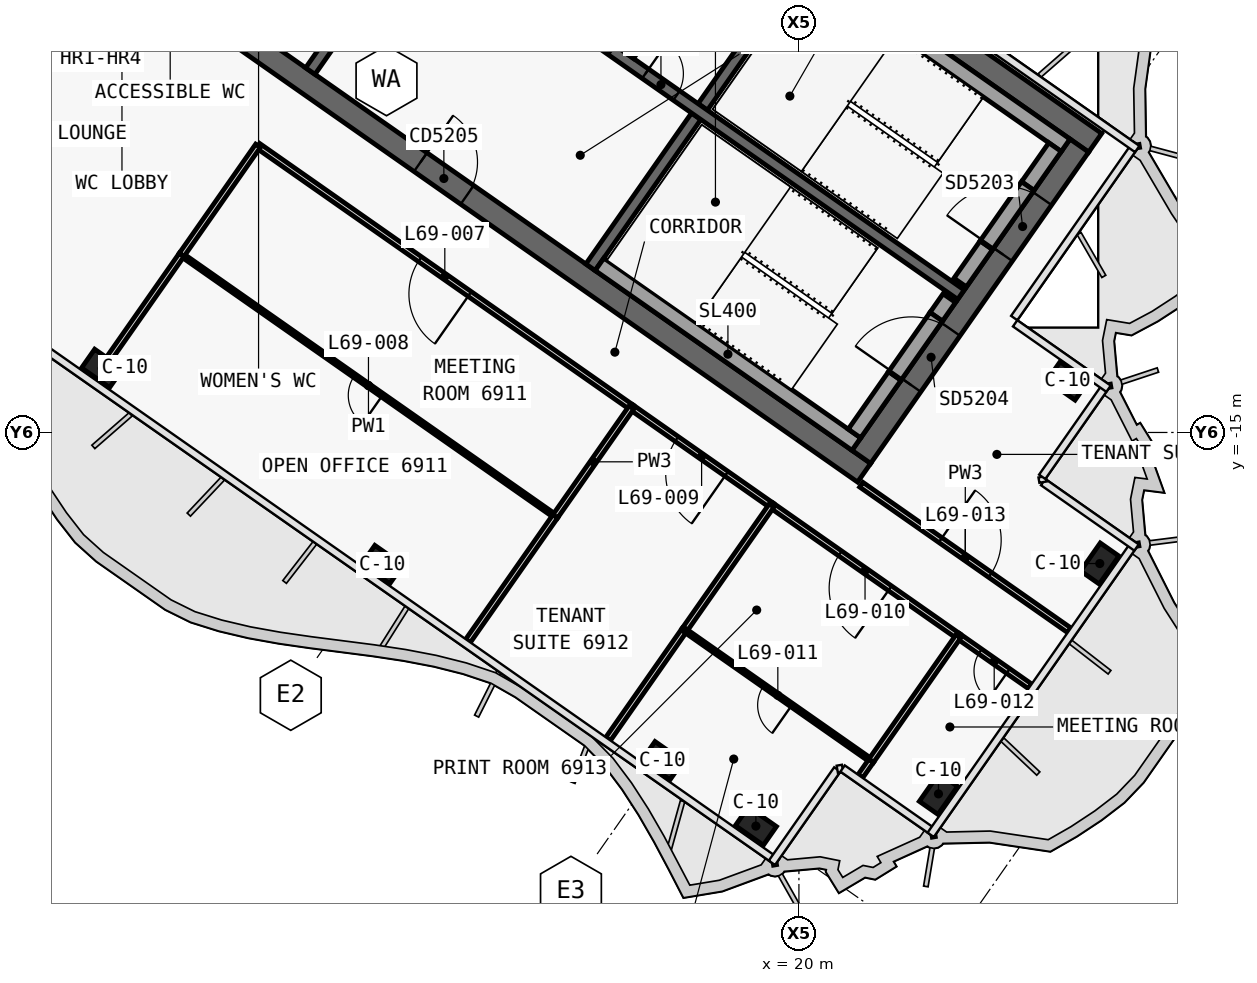
"""IFC4 building model, lengths in metres.
Left out: names, types, materials, properties, quantities, classifications, styles, units other than length and angle.
Written with IfcOpenShell. Run it as: python <this file> out.ifc"""

import sys

from ifc_helpers import new_model, si_unit, direction, frame, frame_2d, origin, origin_2d, place, context, subcontext, project, spatial, polyline, rectangle, outline, extrude, element, fill, save


model = new_model("IFC4")
c1 = context("Model", 3, precision=1e-05, world=origin(), true_north=direction((0.0, 1.0)))
c2 = subcontext(c1, "Body", "Model", "MODEL_VIEW")
j1 = project(units=[si_unit("LENGTHUNIT", "METRE"), si_unit("PLANEANGLEUNIT", "RADIAN")], contexts=[c1])
p1 = place(None, origin())
s1 = spatial("IfcSite", under=j1, at=p1, CompositionType="ELEMENT")
p2 = place(p1, origin())
s2 = spatial("IfcBuilding", under=s1, at=p2, CompositionType="ELEMENT")
p3 = place(p2, frame((0.0, 0.0, 291.7)))
s3 = spatial("IfcBuildingStorey", under=s2, at=p3, CompositionType="ELEMENT", Elevation=291.7)
p4 = place(p3, frame((0.028, 12.066, 0.0), z_axis=(0.0, 0.0, 1.0), x_axis=(0.819151382952, -0.573577380837, 0.0)))
e1 = element("IfcWall", 1, at=p4, inside=s3, PredefinedType="SHEAR", context=c2, shape_type="SweptSolid", body=[
    extrude(outline(polyline([(33.898, 0.3), (0.0, 0.3), (0.42, -0.3), (33.898, -0.3), (33.898, 0.3)])), origin(), (0.0, 0.0, 1.0), 3.9),
])
p5 = place(p3, frame((0.028, -0.874, 0.0), z_axis=(0.0, 0.0, 1.0), x_axis=(0.819150035022, -0.573579305871, 0.0)))
e2 = element("IfcWall", 2, at=p5, inside=s3, PredefinedType="SHEAR", context=c2, shape_type="SweptSolid", body=[
    extrude(outline(polyline([(26.476, 0.3), (0.0, 0.3), (0.42, -0.3), (26.476, -0.3), (26.476, 0.3)])), origin(), (0.0, 0.0, 1.0), 3.9),
])
p6 = place(p5, frame((0.826, 0.0, 0.0)))
e3 = element("IfcOpeningElement", 3, at=p6, cuts=e2, PredefinedType="OPENING", context=c2, shape_type="SweptSolid", body=[
    extrude(rectangle(XDim=1.5, YDim=2.1, at=frame_2d((0.75, 1.05))), frame((0.0, 0.31, 0.0), z_axis=(0.0, -1.0, 0.0), x_axis=(1.0, 0.0, 0.0)), (0.0, 0.0, 1.0), 0.62),
])
p7 = place(p5, frame((12.226, 0.0, 0.0)))
e4 = element("IfcOpeningElement", 4, at=p7, cuts=e2, PredefinedType="OPENING", context=c2, shape_type="SweptSolid", body=[
    extrude(rectangle(XDim=1.5, YDim=2.1, at=frame_2d((0.75, 1.05))), frame((0.0, 0.31, 0.0), z_axis=(0.0, -1.0, 0.0), x_axis=(1.0, 0.0, 0.0)), (0.0, 0.0, 1.0), 0.62),
])
p8 = place(p3, frame((21.642, -15.642, 0.0), z_axis=(0.0, 0.0, 1.0), x_axis=(0.573586866468, 0.819144740944, 0.0)))
e5 = element("IfcWall", 5, at=p8, inside=s3, PredefinedType="SHEAR", context=c2, shape_type="SweptSolid", body=[
    extrude(outline(polyline([(10.0, 0.3), (0.0, 0.3), (0.0, -0.3), (10.0, -0.3), (10.0, 0.3)])), origin(), (0.0, 0.0, 1.0), 3.9),
])
p9 = place(p8, frame((6.5, 0.0, 0.0)))
e6 = element("IfcOpeningElement", 6, at=p9, cuts=e5, PredefinedType="OPENING", context=c2, shape_type="SweptSolid", body=[
    extrude(rectangle(XDim=1.8, YDim=2.1, at=frame_2d((0.9, 1.05))), frame((0.0, 0.31, 0.0), z_axis=(0.0, -1.0, 0.0), x_axis=(1.0, 0.0, 0.0)), (0.0, 0.0, 1.0), 0.62),
])
p10 = place(p8, frame((2.3, 0.0, 0.0)))
e7 = element("IfcOpeningElement", 7, at=p10, cuts=e5, PredefinedType="OPENING", context=c2, shape_type="SweptSolid", body=[
    extrude(rectangle(XDim=1.8, YDim=2.1, at=frame_2d((0.9, 1.05))), frame((0.0, 0.31, 0.0), z_axis=(0.0, -1.0, 0.0), x_axis=(1.0, 0.0, 0.0)), (0.0, 0.0, 1.0), 0.62),
])
p11 = place(p3, frame((7.143, -5.49, 0.0), z_axis=(0.0, 0.0, 1.0), x_axis=(0.573617744349, 0.819123118565, 0.0)))
e8 = element("IfcWall", 8, at=p11, inside=s3, PredefinedType="SHEAR", context=c2, shape_type="SweptSolid", body=[
    extrude(outline(polyline([(0.0, 0.15), (0.0, -0.15), (4.85, -0.15), (4.85, 0.15), (0.0, 0.15)])), origin(), (0.0, 0.0, 1.0), 3.9),
])
p12 = place(p3, frame((14.515, -10.652, 0.0), z_axis=(0.0, 0.0, 1.0), x_axis=(0.573560315113, 0.819163332265, 0.0)))
e9 = element("IfcWall", 9, at=p12, inside=s3, PredefinedType="SHEAR", context=c2, shape_type="SweptSolid", body=[
    extrude(outline(polyline([(0.0, 0.15), (0.0, -0.15), (4.85, -0.15), (4.85, 0.15), (0.0, 0.15)])), origin(), (0.0, 0.0, 1.0), 3.9),
])
p13 = place(p3, frame((17.469, -6.433, 0.0), z_axis=(0.0, 0.0, 1.0), x_axis=(0.573594092424, 0.81913968109, 0.0)))
e10 = element("IfcWall", 10, at=p13, inside=s3, PredefinedType="SHEAR", context=c2, shape_type="SweptSolid", body=[
    extrude(outline(polyline([(4.85, -0.15), (4.85, 0.15), (0.0, 0.15), (0.0, -0.15), (4.85, -0.15)])), origin(), (0.0, 0.0, 1.0), 3.9),
])
p14 = place(p3, frame((2.638, 3.768, 0.0), z_axis=(0.0, 0.0, 1.0), x_axis=(0.819155014212, -0.573572194837, 0.0)))
e11 = element("IfcWall", 11, at=p14, inside=s3, PredefinedType="SHEAR", context=c2, shape_type="SweptSolid", body=[
    extrude(outline(polyline([(0.0, 0.15), (0.0, -0.15), (26.4, -0.15), (26.4, 0.15), (0.0, 0.15)])), origin(), (0.0, 0.0, 1.0), 3.9),
])
p15 = place(p14, frame((9.637, 0.0, 0.0)))
e12 = element("IfcOpeningElement", 12, at=p15, cuts=e11, PredefinedType="OPENING", context=c2, shape_type="SweptSolid", body=[
    extrude(rectangle(XDim=1.2, YDim=2.1, at=frame_2d((0.6, 1.05))), frame((0.0, 0.16, 0.0), z_axis=(0.0, -1.0, 0.0), x_axis=(1.0, 0.0, 0.0)), (0.0, 0.0, 1.0), 0.32),
])
p16 = place(p14, frame((11.812, 0.0, 0.0)))
e13 = element("IfcOpeningElement", 13, at=p16, cuts=e11, PredefinedType="OPENING", context=c2, shape_type="SweptSolid", body=[
    extrude(rectangle(XDim=1.2, YDim=2.1, at=frame_2d((0.6, 1.05))), frame((0.0, 0.16, 0.0), z_axis=(0.0, -1.0, 0.0), x_axis=(1.0, 0.0, 0.0)), (0.0, 0.0, 1.0), 0.32),
])
p17 = place(p14, frame((13.988, 0.0, 0.0)))
e14 = element("IfcOpeningElement", 14, at=p17, cuts=e11, PredefinedType="OPENING", context=c2, shape_type="SweptSolid", body=[
    extrude(rectangle(XDim=1.2, YDim=2.1, at=frame_2d((0.6, 1.05))), frame((0.0, 0.16, 0.0), z_axis=(0.0, -1.0, 0.0), x_axis=(1.0, 0.0, 0.0)), (0.0, 0.0, 1.0), 0.32),
])
p18 = place(p14, frame((16.262, 0.0, 0.0)))
e15 = element("IfcOpeningElement", 15, at=p18, cuts=e11, PredefinedType="OPENING", context=c2, shape_type="SweptSolid", body=[
    extrude(rectangle(XDim=1.0, YDim=2.1, at=frame_2d((0.5, 1.05))), frame((0.0, 0.16, 0.0), z_axis=(0.0, -1.0, 0.0), x_axis=(1.0, 0.0, 0.0)), (0.0, 0.0, 1.0), 0.32),
])
for number, where, z_axis, x_axis in (
    (16, (1.665, -13.313, 0.0), (0.0, 0.0, 1.0), (0.819, -0.574, 0.0)),
    (17, (9.038, -18.475, 0.0), (0.0, 0.0, 1.0), (0.819, -0.574, 0.0)),
    (18, (16.41, -23.637, 0.0), (0.0, 0.0, 1.0), (0.819, -0.574, 0.0)),
    (19, (18.867, -25.358, 0.0), (0.0, 0.0, 1.0), (0.819, -0.574, 0.0)),
    (20, (27.07, -13.644, 0.0), (0.0, 0.0, 1.0), (0.819, -0.574, 0.0)),
    (21, (23.672, -24.51, 0.0), (0.0, 0.0, 1.0), (0.574, 0.819, 0.0)),
    (22, (27.917, -18.449, 0.0), (0.0, 0.0, 1.0), (0.574, 0.819, 0.0)),
):
    element("IfcColumn", number, at=place(p3, frame(where, z_axis=z_axis, x_axis=x_axis)), inside=s3, PredefinedType="COLUMN", context=c2, shape_type="SweptSolid", body=[
        extrude(rectangle(XDim=0.9, YDim=0.6, at=origin_2d()), origin(), (0.0, 0.0, 1.0), 3.9),
    ])
p19 = place(p3, frame((15.565, -5.1, 0.0), z_axis=(0.0, 0.0, 1.0), x_axis=(0.573560315113, 0.819163332265, 0.0)))
e23 = element("IfcWall", 23, at=p19, inside=s3, PredefinedType="SOLIDWALL", context=c2, shape_type="SweptSolid", body=[
    extrude(rectangle(XDim=4.85, YDim=0.2, at=frame_2d((2.425, 0.0))), origin(), (0.0, 0.0, 1.0), 3.9),
])
p20 = place(p3, frame((20.259, -2.71, 0.0), z_axis=(0.0, 0.0, 1.0), x_axis=(0.81914849389, -0.573581506813, 0.0)))
e24 = element("IfcWall", 24, at=p20, inside=s3, PredefinedType="SOLIDWALL", context=c2, shape_type="SweptSolid", body=[
    extrude(rectangle(XDim=8.25, YDim=0.4, at=frame_2d((4.125, 0.0))), origin(), (0.0, 0.0, 1.0), 3.62),
])
p21 = place(p3, frame((24.244, -11.055, 0.0), z_axis=(0.0, 0.0, 1.0), x_axis=(0.573571582932, 0.819155442668, 0.0)))
e25 = element("IfcWall", 25, at=p21, inside=s3, PredefinedType="SOLIDWALL", context=c2, shape_type="SweptSolid", body=[
    extrude(rectangle(XDim=1.2, YDim=0.4, at=frame_2d((0.6, 0.0))), origin(), (0.0, 0.0, 1.0), 3.62),
])
p22 = place(p3, frame((26.022, -8.515, 0.0), z_axis=(0.0, 0.0, 1.0), x_axis=(0.573619628835, 0.819121798889, 0.0)))
e26 = element("IfcWall", 26, at=p22, inside=s3, PredefinedType="SOLIDWALL", context=c2, shape_type="SweptSolid", body=[
    extrude(rectangle(XDim=1.25, YDim=0.4, at=frame_2d((0.625, 0.0))), origin(), (0.0, 0.0, 1.0), 3.62),
])
p23 = place(p3, frame((24.932, -10.072, 2.15), z_axis=(0.0, 0.0, 1.0), x_axis=(0.573591692345, 0.819141361715, 0.0)))
e27 = element("IfcWall", 27, at=p23, inside=s3, PredefinedType="SOLIDWALL", context=c2, shape_type="SweptSolid", body=[
    extrude(rectangle(XDim=1.9, YDim=0.4, at=frame_2d((0.95, 0.0))), origin(), (0.0, 0.0, 1.0), 1.47),
])
p24 = place(p3, frame((14.753, -10.574, 0.0), z_axis=(0.0, 0.0, 1.0), x_axis=(0.819158229677, -0.573567602601, 0.0)))
e28 = element("IfcWall", 28, at=p24, inside=s3, PredefinedType="SOLIDWALL", context=c2, shape_type="SweptSolid", body=[
    extrude(rectangle(XDim=8.25, YDim=0.4, at=frame_2d((4.125, 0.0))), origin(), (0.0, 0.0, 1.0), 3.62),
])
p25 = place(p3, frame((21.462, -15.028, 0.0), z_axis=(0.0, 0.0, 1.0), x_axis=(0.573559770908, 0.819163713305, 0.0)))
e29 = element("IfcWall", 29, at=p25, inside=s3, PredefinedType="SOLIDWALL", context=c2, shape_type="SweptSolid", body=[
    extrude(rectangle(XDim=1.85, YDim=0.4, at=frame_2d((0.925, 0.0))), origin(), (0.0, 0.0, 1.0), 3.62),
])
p26 = place(p3, frame((23.613, -11.956, 0.0), z_axis=(0.0, 0.0, 1.0), x_axis=(0.573435029941, 0.819251039936, 0.0)))
e30 = element("IfcWall", 30, at=p26, inside=s3, PredefinedType="SOLIDWALL", context=c2, shape_type="SweptSolid", body=[
    extrude(rectangle(XDim=0.6, YDim=0.4, at=frame_2d((0.3, 0.0))), origin(), (0.0, 0.0, 1.0), 3.62),
])
p27 = place(p3, frame((22.523, -13.512, 2.15), z_axis=(0.0, 0.0, 1.0), x_axis=(0.573591692345, 0.819141361715, 0.0)))
e31 = element("IfcWall", 31, at=p27, inside=s3, PredefinedType="SOLIDWALL", context=c2, shape_type="SweptSolid", body=[
    extrude(rectangle(XDim=1.9, YDim=0.4, at=frame_2d((0.95, 0.0))), origin(), (0.0, 0.0, 1.0), 1.47),
])
p28 = place(p3, frame((21.642, -16.375, 0.0), z_axis=(0.0, 0.0, 1.0), x_axis=(0.819147777977, -0.573582529227, 0.0)))
e32 = element("IfcWall", 32, at=p28, inside=s3, PredefinedType="PARTITIONING", context=c2, shape_type="SweptSolid", body=[
    extrude(rectangle(XDim=6.68, YDim=0.15, at=frame_2d((3.34, 0.0))), origin(), (0.0, 0.0, 1.0), 3.0),
])
p29 = place(p28, frame((2.54, 0.0, 0.0)))
e33 = element("IfcOpeningElement", 33, at=p29, cuts=e32, PredefinedType="OPENING", context=c2, shape_type="SweptSolid", body=[
    extrude(rectangle(XDim=1.6, YDim=2.1, at=frame_2d((0.8, 1.05))), frame((0.0, 0.085, 0.0), z_axis=(0.0, -1.0, 0.0), x_axis=(1.0, 0.0, 0.0)), (0.0, 0.0, 1.0), 0.17),
])
p30 = place(p3, frame((15.598, -14.34, 0.0), z_axis=(0.0, 0.0, 1.0), x_axis=(-0.81915546166, 0.573571555809, 0.0)))
e34 = element("IfcWall", 34, at=p30, inside=s3, PredefinedType="PARTITIONING", context=c2, shape_type="SweptSolid", body=[
    extrude(rectangle(XDim=12.002, YDim=0.15, at=frame_2d((6.001, 0.0))), origin(), (0.0, 0.0, 1.0), 3.05),
])
p31 = place(p30, frame((5.201, 0.0, 0.0)))
e35 = element("IfcOpeningElement", 35, at=p31, cuts=e34, PredefinedType="OPENING", context=c2, shape_type="SweptSolid", body=[
    extrude(rectangle(XDim=1.6, YDim=2.1, at=frame_2d((0.8, 1.05))), frame((0.0, 0.085, 0.0), z_axis=(0.0, -1.0, 0.0), x_axis=(1.0, 0.0, 0.0)), (0.0, 0.0, 1.0), 0.17),
])
p32 = place(p3, frame((19.284, -16.921, 0.0), z_axis=(0.0, 0.0, 1.0), x_axis=(-0.819165703328, 0.573556928727, 0.0)))
e36 = element("IfcWall", 36, at=p32, inside=s3, PredefinedType="PARTITIONING", context=c2, shape_type="SweptSolid", body=[
    extrude(rectangle(XDim=4.504, YDim=0.15, at=frame_2d((2.252, 0.0))), origin(), (0.0, 0.0, 1.0), 3.62),
])
p33 = place(p32, frame((1.452, 0.0, 0.0)))
e37 = element("IfcOpeningElement", 37, at=p33, cuts=e36, PredefinedType="OPENING", context=c2, shape_type="SweptSolid", body=[
    extrude(rectangle(XDim=1.6, YDim=2.1, at=frame_2d((0.8, 1.05))), frame((0.0, 0.085, 0.0), z_axis=(0.0, -1.0, 0.0), x_axis=(1.0, 0.0, 0.0)), (0.0, 0.0, 1.0), 0.17),
])
p34 = place(p3, frame((24.199, -20.362, 0.0), z_axis=(0.0, 0.0, 1.0), x_axis=(-0.819165052243, 0.573557858619, 0.0)))
e38 = element("IfcWall", 38, at=p34, inside=s3, PredefinedType="PARTITIONING", context=c2, shape_type="SweptSolid", body=[
    extrude(rectangle(XDim=6.004, YDim=0.15, at=frame_2d((3.002, 0.0))), origin(), (0.0, 0.0, 1.0), 3.05),
])
p35 = place(p34, frame((2.202, 0.0, 0.0)))
e39 = element("IfcOpeningElement", 39, at=p35, cuts=e38, PredefinedType="OPENING", context=c2, shape_type="SweptSolid", body=[
    extrude(rectangle(XDim=1.6, YDim=2.1, at=frame_2d((0.8, 1.05))), frame((0.0, 0.085, 0.0), z_axis=(0.0, -1.0, 0.0), x_axis=(1.0, 0.0, 0.0)), (0.0, 0.0, 1.0), 0.17),
])
p36 = place(p3, frame((26.081, -21.68, 0.0), z_axis=(0.0, 0.0, 1.0), x_axis=(-0.819172126429, 0.573547755014, 0.0)))
e40 = element("IfcWall", 40, at=p36, inside=s3, PredefinedType="PARTITIONING", context=c2, shape_type="SweptSolid", body=[
    extrude(rectangle(XDim=2.302, YDim=0.15, at=frame_2d((1.151, 0.0))), origin(), (0.0, 0.0, 1.0), 3.0),
])
p37 = place(p36, frame((0.701, 0.0, 0.0)))
e41 = element("IfcOpeningElement", 41, at=p37, cuts=e40, PredefinedType="OPENING", context=c2, shape_type="SweptSolid", body=[
    extrude(rectangle(XDim=0.9, YDim=2.1, at=frame_2d((0.45, 1.05))), frame((0.0, 0.085, 0.0), z_axis=(0.0, -1.0, 0.0), x_axis=(1.0, 0.0, 0.0)), (0.0, 0.0, 1.0), 0.17),
])
p38 = place(p3, frame((13.588, -17.207, 0.0), z_axis=(0.0, 0.0, 1.0), x_axis=(-0.819156404271, 0.573570209602, 0.0)))
e42 = element("IfcWall", 42, at=p38, inside=s3, PredefinedType="PARTITIONING", context=c2, shape_type="SweptSolid", body=[
    extrude(rectangle(XDim=12.0, YDim=0.1, at=frame_2d((6.0, 0.0))), origin(), (0.0, 0.0, 1.0), 3.05),
])
p39 = place(p38, frame((5.55, 0.0, 0.0)))
e43 = element("IfcOpeningElement", 43, at=p39, cuts=e42, PredefinedType="OPENING", context=c2, shape_type="SweptSolid", body=[
    extrude(rectangle(XDim=0.9, YDim=2.1, at=frame_2d((0.45, 1.05))), frame((0.0, 0.06, 0.0), z_axis=(0.0, -1.0, 0.0), x_axis=(1.0, 0.0, 0.0)), (0.0, 0.0, 1.0), 0.12),
])
p40 = place(p3, frame((13.588, -17.207, 0.0), z_axis=(0.0, 0.0, 1.0), x_axis=(-0.573560675104, -0.819163080207, 0.0)))
e44 = element("IfcWall", 44, at=p40, inside=s3, PredefinedType="PARTITIONING", context=c2, shape_type="SweptSolid", body=[
    extrude(rectangle(XDim=3.999, YDim=0.15, at=frame_2d((2.0, 0.0))), origin(), (0.0, 0.0, 1.0), 3.0),
])
p41 = place(p3, frame((1.849, -13.051, 0.0), z_axis=(0.0, 0.0, 1.0), x_axis=(0.573595235521, 0.819138880647, 0.0)))
e45 = element("IfcWall", 45, at=p41, inside=s3, PredefinedType="PARTITIONING", context=c2, shape_type="SweptSolid", body=[
    extrude(rectangle(XDim=3.329, YDim=0.15, at=frame_2d((1.665, 0.0))), origin(), (0.0, 0.0, 1.0), 3.05),
])
p42 = place(p3, frame((15.596, -14.339, 0.0), z_axis=(0.0, 0.0, 1.0), x_axis=(-0.573565328398, -0.819159822049, 0.0)))
e46 = element("IfcWall", 46, at=p42, inside=s3, PredefinedType="PARTITIONING", context=c2, shape_type="SweptSolid", body=[
    extrude(rectangle(XDim=3.5, YDim=0.15, at=frame_2d((1.75, 0.0))), origin(), (0.0, 0.0, 1.0), 3.62),
])
p43 = place(p3, frame((3.759, -10.323, 0.0), z_axis=(0.0, 0.0, 1.0), x_axis=(0.573598101901, 0.81913687348, 0.0)))
e47 = element("IfcWall", 47, at=p43, inside=s3, PredefinedType="PARTITIONING", context=c2, shape_type="SweptSolid", body=[
    extrude(rectangle(XDim=3.5, YDim=0.15, at=frame_2d((1.75, 0.0))), origin(), (0.0, 0.0, 1.0), 3.05),
])
p44 = place(p3, frame((16.989, -20.196, 0.0), z_axis=(0.0, 0.0, 1.0), x_axis=(-0.573560622794, -0.819163116834, 0.0)))
e48 = element("IfcWall", 48, at=p44, inside=s3, PredefinedType="PARTITIONING", context=c2, shape_type="SweptSolid", body=[
    extrude(rectangle(XDim=3.501, YDim=0.15, at=frame_2d((1.75, 0.0))), origin(), (0.0, 0.0, 1.0), 3.0),
])
p45 = place(p3, frame((19.282, -16.92, 0.0), z_axis=(0.0, 0.0, 1.0), x_axis=(-0.573630198485, -0.819114397008, 0.0)))
e49 = element("IfcWall", 49, at=p45, inside=s3, PredefinedType="PARTITIONING", context=c2, shape_type="SweptSolid", body=[
    extrude(rectangle(XDim=4.002, YDim=0.15, at=frame_2d((2.001, 0.0))), origin(), (0.0, 0.0, 1.0), 3.62),
])
p46 = place(p3, frame((21.902, -23.639, 0.0), z_axis=(0.0, 0.0, 1.0), x_axis=(-0.819149710902, 0.573579768758, 0.0)))
e50 = element("IfcWall", 50, at=p46, inside=s3, PredefinedType="PARTITIONING", context=c2, shape_type="SweptSolid", body=[
    extrude(rectangle(XDim=6.0, YDim=0.1, at=frame_2d((3.0, 0.0))), origin(), (0.0, 0.0, 1.0), 3.05),
])
p47 = place(p46, frame((2.55, 0.0, 0.0)))
e51 = element("IfcOpeningElement", 51, at=p47, cuts=e50, PredefinedType="OPENING", context=c2, shape_type="SweptSolid", body=[
    extrude(rectangle(XDim=0.9, YDim=2.1, at=frame_2d((0.45, 1.05))), frame((0.0, 0.06, 0.0), z_axis=(0.0, -1.0, 0.0), x_axis=(1.0, 0.0, 0.0)), (0.0, 0.0, 1.0), 0.12),
])
p48 = place(p3, frame((21.902, -23.639, 0.0), z_axis=(0.0, 0.0, 1.0), x_axis=(-0.573298184438, -0.819346807964, 0.0)))
e52 = element("IfcWall", 52, at=p48, inside=s3, PredefinedType="PARTITIONING", context=c2, shape_type="SweptSolid", body=[
    extrude(rectangle(XDim=0.499, YDim=0.15, at=frame_2d((0.25, 0.0))), origin(), (0.0, 0.0, 1.0), 3.62),
])
p49 = place(p3, frame((24.197, -20.361, 0.0), z_axis=(0.0, 0.0, 1.0), x_axis=(-0.573556557423, -0.819165963305, 0.0)))
e53 = element("IfcWall", 53, at=p49, inside=s3, PredefinedType="PARTITIONING", context=c2, shape_type="SweptSolid", body=[
    extrude(rectangle(XDim=4.0, YDim=0.15, at=frame_2d((2.0, 0.0))), origin(), (0.0, 0.0, 1.0), 3.05),
])
p50 = place(p18, origin())
e54 = element("IfcDoor", 54, at=p50, inside=s3, OperationType="SINGLE_SWING_RIGHT", PredefinedType="DOOR", context=c2, shape_type="SweptSolid", body=[
    extrude(rectangle(XDim=1.0, YDim=2.1, at=frame_2d((0.5, 1.05))), frame((0.0, 0.025, 0.0), z_axis=(0.0, -1.0, 0.0), x_axis=(1.0, 0.0, 0.0)), (0.0, 0.0, 1.0), 0.05),
])
fill(e15, e54)
p51 = place(p7, origin())
e55 = element("IfcDoor", 55, at=p51, inside=s3, OperationType="DOUBLE_DOOR_SINGLE_SWING", PredefinedType="DOOR", context=c2, shape_type="SweptSolid", body=[
    extrude(rectangle(XDim=1.5, YDim=2.1, at=frame_2d((0.75, 1.05))), frame((0.0, 0.025, 0.0), z_axis=(0.0, -1.0, 0.0), x_axis=(1.0, 0.0, 0.0)), (0.0, 0.0, 1.0), 0.05),
])
fill(e4, e55)
p52 = place(p9, origin())
e56 = element("IfcDoor", 56, at=p52, inside=s3, OperationType="DOUBLE_DOOR_SINGLE_SWING", PredefinedType="DOOR", context=c2, shape_type="SweptSolid", body=[
    extrude(rectangle(XDim=1.8, YDim=2.1, at=frame_2d((0.9, 1.05))), frame((0.0, 0.025, 0.0), z_axis=(0.0, -1.0, 0.0), x_axis=(1.0, 0.0, 0.0)), (0.0, 0.0, 1.0), 0.05),
])
fill(e6, e56)
p53 = place(p10, origin())
e57 = element("IfcDoor", 57, at=p53, inside=s3, OperationType="DOUBLE_DOOR_SINGLE_SWING", PredefinedType="DOOR", context=c2, shape_type="SweptSolid", body=[
    extrude(rectangle(XDim=1.8, YDim=2.1, at=frame_2d((0.9, 1.05))), frame((0.0, 0.025, 0.0), z_axis=(0.0, -1.0, 0.0), x_axis=(1.0, 0.0, 0.0)), (0.0, 0.0, 1.0), 0.05),
])
fill(e7, e57)
p54 = place(p31, origin())
e58 = element("IfcDoor", 58, at=p54, inside=s3, OperationType="DOUBLE_DOOR_SINGLE_SWING", PredefinedType="DOOR", context=c2, shape_type="SweptSolid", body=[
    extrude(rectangle(XDim=1.6, YDim=2.1, at=frame_2d((0.8, 1.05))), frame((0.0, 0.025, 0.0), z_axis=(0.0, -1.0, 0.0), x_axis=(1.0, 0.0, 0.0)), (0.0, 0.0, 1.0), 0.05),
])
fill(e35, e58)
p55 = place(p39, origin())
e59 = element("IfcDoor", 59, at=p55, inside=s3, OperationType="SINGLE_SWING_RIGHT", PredefinedType="DOOR", context=c2, shape_type="SweptSolid", body=[
    extrude(rectangle(XDim=0.9, YDim=2.1, at=frame_2d((0.45, 1.05))), frame((0.0, 0.025, 0.0), z_axis=(0.0, -1.0, 0.0), x_axis=(1.0, 0.0, 0.0)), (0.0, 0.0, 1.0), 0.05),
])
fill(e43, e59)
p56 = place(p33, origin())
e60 = element("IfcDoor", 60, at=p56, inside=s3, OperationType="DOUBLE_DOOR_SINGLE_SWING", PredefinedType="DOOR", context=c2, shape_type="SweptSolid", body=[
    extrude(rectangle(XDim=1.6, YDim=2.1, at=frame_2d((0.8, 1.05))), frame((0.0, 0.025, 0.0), z_axis=(0.0, -1.0, 0.0), x_axis=(1.0, 0.0, 0.0)), (0.0, 0.0, 1.0), 0.05),
])
fill(e37, e60)
p57 = place(p35, origin())
e61 = element("IfcDoor", 61, at=p57, inside=s3, OperationType="DOUBLE_DOOR_SINGLE_SWING", PredefinedType="DOOR", context=c2, shape_type="SweptSolid", body=[
    extrude(rectangle(XDim=1.6, YDim=2.1, at=frame_2d((0.8, 1.05))), frame((0.0, 0.025, 0.0), z_axis=(0.0, -1.0, 0.0), x_axis=(1.0, 0.0, 0.0)), (0.0, 0.0, 1.0), 0.05),
])
fill(e39, e61)
p58 = place(p47, origin())
e62 = element("IfcDoor", 62, at=p58, inside=s3, OperationType="SINGLE_SWING_LEFT", PredefinedType="DOOR", context=c2, shape_type="SweptSolid", body=[
    extrude(rectangle(XDim=0.9, YDim=2.1, at=frame_2d((0.45, 1.05))), frame((0.0, 0.025, 0.0), z_axis=(0.0, -1.0, 0.0), x_axis=(1.0, 0.0, 0.0)), (0.0, 0.0, 1.0), 0.05),
])
fill(e51, e62)
p59 = place(p37, origin())
e63 = element("IfcDoor", 63, at=p59, inside=s3, OperationType="SINGLE_SWING_RIGHT", PredefinedType="DOOR", context=c2, shape_type="SweptSolid", body=[
    extrude(rectangle(XDim=0.9, YDim=2.1, at=frame_2d((0.45, 1.05))), frame((0.0, 0.025, 0.0), z_axis=(0.0, -1.0, 0.0), x_axis=(1.0, 0.0, 0.0)), (0.0, 0.0, 1.0), 0.05),
])
fill(e41, e63)
p60 = place(p29, origin())
e64 = element("IfcDoor", 64, at=p60, inside=s3, OperationType="DOUBLE_DOOR_SINGLE_SWING", PredefinedType="DOOR", context=c2, shape_type="SweptSolid", body=[
    extrude(rectangle(XDim=1.6, YDim=2.1, at=frame_2d((0.8, 1.05))), frame((0.0, 0.025, 0.0), z_axis=(0.0, -1.0, 0.0), x_axis=(1.0, 0.0, 0.0)), (0.0, 0.0, 1.0), 0.05),
])
fill(e33, e64)
save(model, sys.argv[1])
